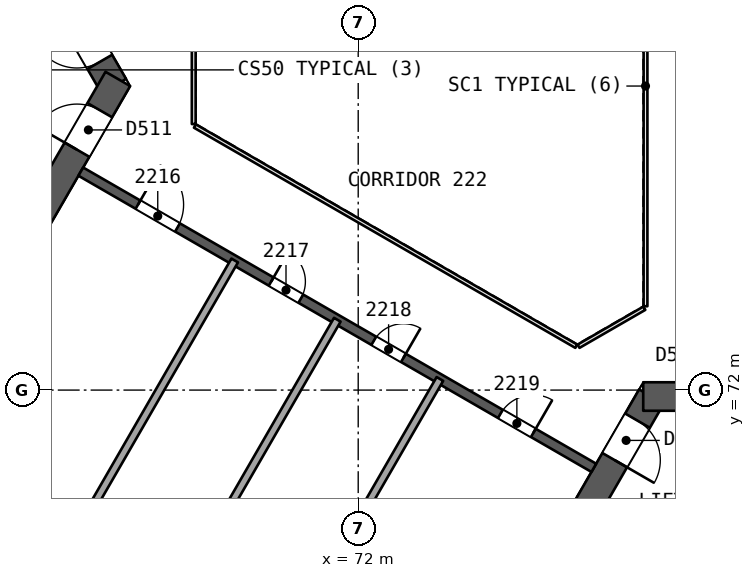
"""IFC4 building model, lengths in metres.
Left out: names, types, materials, properties, quantities, classifications, styles, units other than length and angle.
Written with IfcOpenShell. Run it as: python <this file> out.ifc"""

import sys

from ifc_helpers import new_model, si_unit, direction, frame, frame_2d, origin, place, context, subcontext, project, spatial, rectangle, extrude, element, fill, save


model = new_model("IFC4")
c1 = context("Model", 3, precision=1e-05, world=origin(), true_north=direction((0.0, 1.0)))
c2 = subcontext(c1, "Body", "Model", "MODEL_VIEW")
j1 = project(units=[si_unit("LENGTHUNIT", "METRE"), si_unit("PLANEANGLEUNIT", "RADIAN")], contexts=[c1])
p1 = place(None, origin())
s1 = spatial("IfcSite", under=j1, at=p1, CompositionType="ELEMENT")
p2 = place(p1, origin())
s2 = spatial("IfcBuilding", under=s1, at=p2, CompositionType="ELEMENT")
p3 = place(p2, frame((0.0, 0.0, 94.3)))
s3 = spatial("IfcBuildingStorey", under=s2, at=p3, CompositionType="ELEMENT", Elevation=94.3)
p4 = place(p3, frame((65.567, 80.0, 0.0), z_axis=(0.0, 0.0, 1.0), x_axis=(-0.499988615364, 0.866031976607, 0.0)))
e1 = element("IfcWall", 1, at=p4, inside=s3, PredefinedType="SHEAR", context=c2, shape_type="SweptSolid", body=[
    extrude(rectangle(XDim=10.163, YDim=0.75, at=frame_2d((5.082, 0.0))), origin(), (0.0, 0.0, 1.0), 3.7),
])
p5 = place(p4, frame((0.733, 0.0, 0.0)))
e2 = element("IfcOpeningElement", 2, at=p5, cuts=e1, PredefinedType="OPENING", context=c2, shape_type="SweptSolid", body=[
    extrude(rectangle(XDim=1.2, YDim=2.1, at=frame_2d((0.6, 1.05))), frame((0.0, 0.385, 0.0), z_axis=(0.0, -1.0, 0.0), x_axis=(1.0, 0.0, 0.0)), (0.0, 0.0, 1.0), 0.771),
])
p6 = place(p3, frame((60.673, 71.523, 0.0), z_axis=(0.0, 0.0, 1.0), x_axis=(0.499997052475, 0.866027105532, 0.0)))
e3 = element("IfcWall", 3, at=p6, inside=s3, PredefinedType="SHEAR", context=c2, shape_type="SweptSolid", body=[
    extrude(rectangle(XDim=10.005, YDim=0.75, at=frame_2d((5.002, 0.0))), origin(), (0.0, 0.0, 1.0), 3.7),
])
p7 = place(p6, frame((7.855, 0.0, 0.0)))
e4 = element("IfcOpeningElement", 4, at=p7, cuts=e3, PredefinedType="OPENING", context=c2, shape_type="SweptSolid", body=[
    extrude(rectangle(XDim=1.2, YDim=2.1, at=frame_2d((0.6, 1.05))), frame((0.0, 0.385, 0.0), z_axis=(0.0, -1.0, 0.0), x_axis=(1.0, 0.0, 0.0)), (0.0, 0.0, 1.0), 0.771),
])
p8 = place(p3, frame((79.717, 71.831, 0.0), z_axis=(0.0, 0.0, 1.0), x_axis=(-0.499996230114, -0.866027580318, 0.0)))
e5 = element("IfcWall", 5, at=p8, inside=s3, PredefinedType="SHEAR", context=c2, shape_type="SweptSolid", body=[
    extrude(rectangle(XDim=10.164, YDim=0.75, at=frame_2d((5.082, 0.0))), origin(), (0.0, 0.0, 1.0), 3.7),
])
p9 = place(p8, frame((0.733, 0.0, 0.0)))
e6 = element("IfcOpeningElement", 6, at=p9, cuts=e5, PredefinedType="OPENING", context=c2, shape_type="SweptSolid", body=[
    extrude(rectangle(XDim=1.2, YDim=2.1, at=frame_2d((0.6, 1.05))), frame((0.0, 0.385, 0.0), z_axis=(0.0, -1.0, 0.0), x_axis=(1.0, 0.0, 0.0)), (0.0, 0.0, 1.0), 0.771),
])
p10 = place(p3, frame((89.505, 71.831, 0.0), z_axis=(0.0, 0.0, 1.0), x_axis=(-1.0, 0.0, 0.0)))
e7 = element("IfcWall", 7, at=p10, inside=s3, PredefinedType="SHEAR", context=c2, shape_type="SweptSolid", body=[
    extrude(rectangle(XDim=10.005, YDim=0.75, at=frame_2d((5.002, 0.0))), origin(), (0.0, 0.0, 1.0), 3.7),
])
p11 = place(p10, frame((7.855, 0.0, 0.0)))
e8 = element("IfcOpeningElement", 8, at=p11, cuts=e7, PredefinedType="OPENING", context=c2, shape_type="SweptSolid", body=[
    extrude(rectangle(XDim=1.2, YDim=2.1, at=frame_2d((0.6, 1.05))), frame((0.0, 0.385, 0.0), z_axis=(0.0, -1.0, 0.0), x_axis=(1.0, 0.0, 0.0)), (0.0, 0.0, 1.0), 0.771),
])
p12 = place(p3, frame((64.7, 77.748, 0.0), z_axis=(0.0, 0.0, 1.0), x_axis=(0.866026492143, -0.499998114903, 0.0)))
e9 = element("IfcWall", 9, at=p12, inside=s3, PredefinedType="SHEAR", context=c2, shape_type="SweptSolid", body=[
    extrude(rectangle(XDim=15.588, YDim=0.25, at=frame_2d((7.794, 0.0))), origin(), (0.0, 0.0, 1.0), 3.25),
])
p13 = place(p12, frame((1.738, 0.0, 0.0)))
e10 = element("IfcOpeningElement", 10, at=p13, cuts=e9, PredefinedType="OPENING", context=c2, shape_type="SweptSolid", body=[
    extrude(rectangle(XDim=1.2, YDim=2.4, at=frame_2d((0.6, 1.2))), frame((0.0, 0.135, 0.0), z_axis=(0.0, -1.0, 0.0), x_axis=(1.0, 0.0, 0.0)), (0.0, 0.0, 1.0), 0.271),
])
p14 = place(p12, frame((5.785, 0.0, 0.0)))
e11 = element("IfcOpeningElement", 11, at=p14, cuts=e9, PredefinedType="OPENING", context=c2, shape_type="SweptSolid", body=[
    extrude(rectangle(XDim=0.9, YDim=2.1, at=frame_2d((0.45, 1.05))), frame((0.0, 0.135, 0.0), z_axis=(0.0, -1.0, 0.0), x_axis=(1.0, 0.0, 0.0)), (0.0, 0.0, 1.0), 0.271),
])
p15 = place(p12, frame((8.903, 0.0, 0.0)))
e12 = element("IfcOpeningElement", 12, at=p15, cuts=e9, PredefinedType="OPENING", context=c2, shape_type="SweptSolid", body=[
    extrude(rectangle(XDim=0.9, YDim=2.1, at=frame_2d((0.45, 1.05))), frame((0.0, 0.135, 0.0), z_axis=(0.0, -1.0, 0.0), x_axis=(1.0, 0.0, 0.0)), (0.0, 0.0, 1.0), 0.271),
])
p16 = place(p12, frame((12.75, 0.0, 0.0)))
e13 = element("IfcOpeningElement", 13, at=p16, cuts=e9, PredefinedType="OPENING", context=c2, shape_type="SweptSolid", body=[
    extrude(rectangle(XDim=1.0, YDim=2.1, at=frame_2d((0.5, 1.05))), frame((0.0, 0.135, 0.0), z_axis=(0.0, -1.0, 0.0), x_axis=(1.0, 0.0, 0.0)), (0.0, 0.0, 1.0), 0.271),
])
for number, where, z_axis, x_axis in (
    (14, (62.274, 64.193, 0.0), (0.0, 0.0, 1.0), (0.5, 0.866, 0.0)),
    (15, (64.974, 62.634, 0.0), (0.0, 0.0, 1.0), (0.5, 0.866, 0.0)),
    (16, (67.674, 61.075, 0.0), (0.0, 0.0, 1.0), (0.5, 0.866, 0.0)),
):
    element("IfcWall", number, at=place(p3, frame(where, z_axis=z_axis, x_axis=x_axis)), inside=s3, PredefinedType="PARTITIONING", context=c2, shape_type="SweptSolid", body=[
        extrude(rectangle(XDim=12.953, YDim=0.2, at=frame_2d((6.477, 0.0))), origin(), (0.0, 0.0, 1.0), 3.25),
    ])
p17 = place(p3, frame((90.054, 47.981, 0.0), z_axis=(0.0, 0.0, 1.0), x_axis=(-0.866025390357, 0.500000023256, 0.0)))
e17 = element("IfcWall", 17, at=p17, inside=s3, PredefinedType="SOLIDWALL", context=c2, shape_type="SweptSolid", body=[
    extrude(rectangle(XDim=58.093, YDim=0.3, at=frame_2d((29.046, 0.0))), origin(), (0.0, 0.0, 1.0), 3.25),
])
p18 = place(p17, frame((43.972, 0.0, 0.0)))
e18 = element("IfcOpeningElement", 18, at=p18, cuts=e17, PredefinedType="OPENING", context=c2, shape_type="SweptSolid", body=[
    extrude(rectangle(XDim=2.4, YDim=2.4, at=frame_2d((1.2, 1.2))), frame((0.0, 0.161, 0.0), z_axis=(0.0, -1.0, 0.0), x_axis=(1.0, 0.0, 0.0)), (0.0, 0.0, 1.0), 0.321),
])
p19 = place(p17, frame((22.39, 0.0, 0.0)))
e19 = element("IfcOpeningElement", 19, at=p19, cuts=e17, PredefinedType="OPENING", context=c2, shape_type="SweptSolid", body=[
    extrude(rectangle(XDim=2.4, YDim=2.4, at=frame_2d((1.2, 1.2))), frame((0.0, 0.161, 0.0), z_axis=(0.0, -1.0, 0.0), x_axis=(1.0, 0.0, 0.0)), (0.0, 0.0, 1.0), 0.321),
])
p20 = place(p17, frame((10.643, 0.0, 0.0)))
e20 = element("IfcOpeningElement", 20, at=p20, cuts=e17, PredefinedType="OPENING", context=c2, shape_type="SweptSolid", body=[
    extrude(rectangle(XDim=2.4, YDim=2.4, at=frame_2d((1.2, 1.2))), frame((0.0, 0.161, 0.0), z_axis=(0.0, -1.0, 0.0), x_axis=(1.0, 0.0, 0.0)), (0.0, 0.0, 1.0), 0.321),
])
p21 = place(p17, frame((29.705, 0.0, 0.9)))
e21 = element("IfcOpeningElement", 21, at=p21, cuts=e17, PredefinedType="OPENING", context=c2, shape_type="SweptSolid", body=[
    extrude(rectangle(XDim=1.8, YDim=1.5, at=frame_2d((0.9, 0.75))), frame((0.0, 0.161, 0.0), z_axis=(0.0, -1.0, 0.0), x_axis=(1.0, 0.0, 0.0)), (0.0, 0.0, 1.0), 0.321),
])
p22 = place(p17, frame((26.587, 0.0, 0.9)))
e22 = element("IfcOpeningElement", 22, at=p22, cuts=e17, PredefinedType="OPENING", context=c2, shape_type="SweptSolid", body=[
    extrude(rectangle(XDim=1.8, YDim=1.5, at=frame_2d((0.9, 0.75))), frame((0.0, 0.161, 0.0), z_axis=(0.0, -1.0, 0.0), x_axis=(1.0, 0.0, 0.0)), (0.0, 0.0, 1.0), 0.321),
])
p23 = place(p3, frame((77.135, 64.952, 0.0), z_axis=(0.0, 0.0, 1.0), x_axis=(0.866031916153, 0.499988720078, 0.0)))
e23 = element("IfcWall", 23, at=p23, inside=s3, PredefinedType="SOLIDWALL", context=c2, shape_type="SweptSolid", body=[
    extrude(rectangle(XDim=11.35, YDim=0.2, at=frame_2d((5.675, 0.0))), origin(), (0.0, 0.0, 1.0), 3.25),
])
p24 = place(p3, frame((79.56, 74.206, 0.0), z_axis=(0.0, 0.0, 1.0), x_axis=(0.0, 1.0, 0.0)))
e24 = element("IfcWall", 24, at=p24, inside=s3, PredefinedType="PARTITIONING", context=c2, shape_type="SweptSolid", body=[
    extrude(rectangle(XDim=11.588, YDim=0.1, at=frame_2d((5.794, 0.0))), origin(), (0.0, 0.0, 1.0), 3.25),
])
p25 = place(p3, frame((67.672, 81.0, 0.0), z_axis=(0.0, 0.0, 1.0), x_axis=(0.0, -1.0, 0.0)))
e25 = element("IfcWall", 25, at=p25, inside=s3, PredefinedType="PARTITIONING", context=c2, shape_type="SweptSolid", body=[
    extrude(rectangle(XDim=2.0, YDim=0.1, at=frame_2d((1.0, 0.0))), origin(), (0.0, 0.0, 1.0), 3.25),
])
p26 = place(p3, frame((67.702, 78.948, 0.0), z_axis=(0.0, 0.0, 1.0), x_axis=(0.866026658274, -0.499997827154, 0.0)))
e26 = element("IfcWall", 26, at=p26, inside=s3, PredefinedType="PARTITIONING", context=c2, shape_type="SweptSolid", body=[
    extrude(rectangle(XDim=11.588, YDim=0.1, at=frame_2d((5.794, 0.0))), origin(), (0.0, 0.0, 1.0), 3.25),
])
p27 = place(p3, frame((77.798, 73.154, 0.0), z_axis=(0.0, 0.0, 1.0), x_axis=(0.866041268327, 0.499972520799, 0.0)))
e27 = element("IfcWall", 27, at=p27, inside=s3, PredefinedType="PARTITIONING", context=c2, shape_type="SweptSolid", body=[
    extrude(rectangle(XDim=2.0, YDim=0.1, at=frame_2d((1.0, 0.0))), origin(), (0.0, 0.0, 1.0), 3.25),
])
p28 = place(p13, origin())
e28 = element("IfcDoor", 28, at=p28, inside=s3, OperationType="SINGLE_SWING_LEFT", PredefinedType="NOTDEFINED", context=c2, shape_type="SweptSolid", body=[
    extrude(rectangle(XDim=1.2, YDim=2.4, at=frame_2d((0.6, 1.2))), frame((0.0, 0.025, 0.0), z_axis=(0.0, -1.0, 0.0), x_axis=(1.0, 0.0, 0.0)), (0.0, 0.0, 1.0), 0.05),
])
fill(e10, e28)
p29 = place(p14, origin())
e29 = element("IfcDoor", 29, at=p29, inside=s3, OperationType="SINGLE_SWING_LEFT", PredefinedType="NOTDEFINED", context=c2, shape_type="SweptSolid", body=[
    extrude(rectangle(XDim=0.9, YDim=2.1, at=frame_2d((0.45, 1.05))), frame((0.0, 0.025, 0.0), z_axis=(0.0, -1.0, 0.0), x_axis=(1.0, 0.0, 0.0)), (0.0, 0.0, 1.0), 0.05),
])
fill(e11, e29)
p30 = place(p15, origin())
e30 = element("IfcDoor", 30, at=p30, inside=s3, OperationType="SINGLE_SWING_RIGHT", PredefinedType="NOTDEFINED", context=c2, shape_type="SweptSolid", body=[
    extrude(rectangle(XDim=0.9, YDim=2.1, at=frame_2d((0.45, 1.05))), frame((0.0, 0.025, 0.0), z_axis=(0.0, -1.0, 0.0), x_axis=(1.0, 0.0, 0.0)), (0.0, 0.0, 1.0), 0.05),
])
fill(e12, e30)
p31 = place(p16, origin())
e31 = element("IfcDoor", 31, at=p31, inside=s3, OperationType="SINGLE_SWING_RIGHT", PredefinedType="NOTDEFINED", context=c2, shape_type="SweptSolid", body=[
    extrude(rectangle(XDim=1.0, YDim=2.1, at=frame_2d((0.5, 1.05))), frame((0.0, 0.025, 0.0), z_axis=(0.0, -1.0, 0.0), x_axis=(1.0, 0.0, 0.0)), (0.0, 0.0, 1.0), 0.05),
])
fill(e13, e31)
p32 = place(p5, origin())
e32 = element("IfcDoor", 32, at=p32, inside=s3, OperationType="SINGLE_SWING_RIGHT", PredefinedType="NOTDEFINED", context=c2, shape_type="SweptSolid", body=[
    extrude(rectangle(XDim=1.2, YDim=2.1, at=frame_2d((0.6, 1.05))), frame((0.0, 0.025, 0.0), z_axis=(0.0, -1.0, 0.0), x_axis=(1.0, 0.0, 0.0)), (0.0, 0.0, 1.0), 0.05),
])
fill(e2, e32)
p33 = place(p7, origin())
e33 = element("IfcDoor", 33, at=p33, inside=s3, OperationType="SINGLE_SWING_LEFT", PredefinedType="NOTDEFINED", context=c2, shape_type="SweptSolid", body=[
    extrude(rectangle(XDim=1.2, YDim=2.1, at=frame_2d((0.6, 1.05))), frame((0.0, 0.025, 0.0), z_axis=(0.0, -1.0, 0.0), x_axis=(1.0, 0.0, 0.0)), (0.0, 0.0, 1.0), 0.05),
])
fill(e4, e33)
p34 = place(p9, origin())
e34 = element("IfcDoor", 34, at=p34, inside=s3, OperationType="SINGLE_SWING_RIGHT", PredefinedType="NOTDEFINED", context=c2, shape_type="SweptSolid", body=[
    extrude(rectangle(XDim=1.2, YDim=2.1, at=frame_2d((0.6, 1.05))), frame((0.0, 0.025, 0.0), z_axis=(0.0, -1.0, 0.0), x_axis=(1.0, 0.0, 0.0)), (0.0, 0.0, 1.0), 0.05),
])
fill(e6, e34)
save(model, sys.argv[1])
